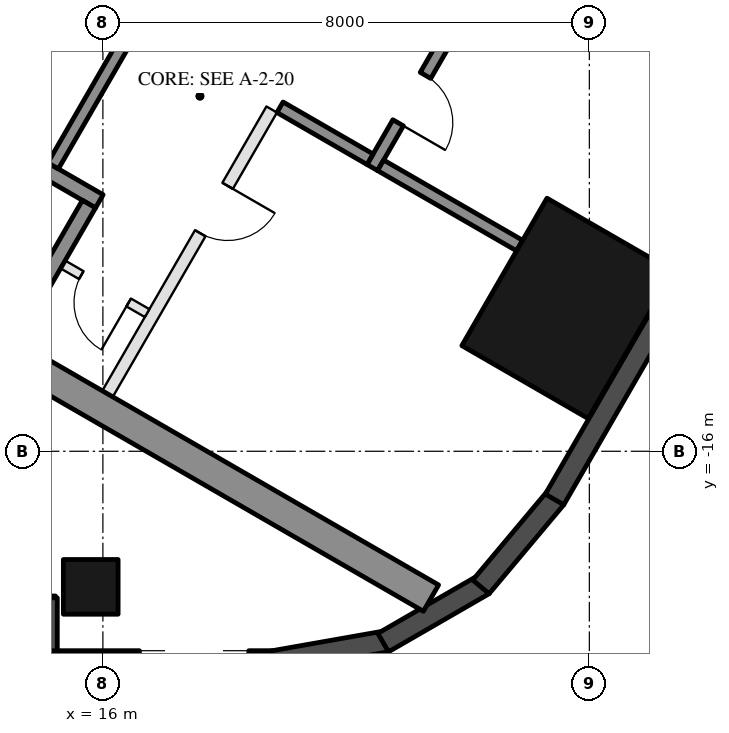
"""IFC4 building model, lengths in metres.
Left out: names, types, materials, properties, quantities, classifications, styles, units other than length and angle.
Written with IfcOpenShell. Run it as: python <this file> out.ifc"""

import sys

from ifc_helpers import new_model, si_unit, direction, frame, frame_2d, origin, origin_2d, place, context, subcontext, project, spatial, rectangle, hollow_rectangle, extrude, element, fill, save


model = new_model("IFC4")
c1 = context("Model", 3, precision=1e-05, world=origin(), true_north=direction((0.0, 1.0)))
c2 = subcontext(c1, "Body", "Model", "MODEL_VIEW")
j1 = project(units=[si_unit("LENGTHUNIT", "METRE"), si_unit("PLANEANGLEUNIT", "RADIAN")], contexts=[c1])
p1 = place(None, origin())
s1 = spatial("IfcSite", under=j1, at=p1, CompositionType="ELEMENT")
p2 = place(p1, origin())
s2 = spatial("IfcBuilding", under=s1, at=p2, CompositionType="ELEMENT")
p3 = place(p2, frame((0.0, 0.0, 94.6)))
s3 = spatial("IfcBuildingStorey", under=s2, at=p3, CompositionType="ELEMENT", Elevation=94.6)
p4 = place(p3, frame((15.8, -18.23, 0.0), z_axis=(0.0, 0.0, 1.0), x_axis=(-1.0, 0.0, 0.0)))
e1 = element("IfcColumn", 1, at=p4, inside=s3, PredefinedType="COLUMN", context=c2, shape_type="SweptSolid", body=[
    extrude(hollow_rectangle(XDim=0.9, YDim=0.9, WallThickness=0.04, at=origin_2d()), origin(), (0.0, 0.0, 1.0), 3.7),
])
p5 = place(p3, frame((23.643, -13.65, 0.0), z_axis=(0.0, 0.0, 1.0), x_axis=(0.5, 0.866025403784, 0.0)))
e2 = element("IfcColumn", 2, at=p5, inside=s3, PredefinedType="COLUMN", context=c2, shape_type="SweptSolid", body=[
    extrude(hollow_rectangle(XDim=2.8, YDim=2.4, WallThickness=0.07, at=origin_2d()), origin(), (0.0, 0.0, 1.0), 3.7),
])
p6 = place(p3, frame((8.48, -18.555, 0.0), z_axis=(0.0, 0.0, 1.0), x_axis=(1.0, 0.0, 0.0)))
e3 = element("IfcWall", 3, at=p6, inside=s3, PredefinedType="SOLIDWALL", context=c2, shape_type="SweptSolid", body=[
    extrude(rectangle(XDim=6.74, YDim=0.35, at=frame_2d((3.37, 0.0))), origin(), (0.0, 0.0, 1.0), 3.55),
])
p7 = place(p6, frame((3.57, 0.0, 0.0)))
e4 = element("IfcOpeningElement", 4, at=p7, cuts=e3, PredefinedType="OPENING", context=c2, shape_type="SweptSolid", body=[
    extrude(rectangle(XDim=2.4, YDim=2.4, at=frame_2d((1.2, 1.2))), frame((0.0, 0.185, 0.0), z_axis=(0.0, -1.0, 0.0), x_axis=(1.0, 0.0, 0.0)), (0.0, 0.0, 1.0), 0.37),
])
p8 = place(p6, frame((0.32, 0.0, 0.3)))
e5 = element("IfcOpeningElement", 5, at=p8, cuts=e3, PredefinedType="OPENING", context=c2, shape_type="SweptSolid", body=[
    extrude(rectangle(XDim=2.9, YDim=2.65, at=frame_2d((1.45, 1.325))), frame((0.0, 0.185, 0.0), z_axis=(0.0, -1.0, 0.0), x_axis=(1.0, 0.0, 0.0)), (0.0, 0.0, 1.0), 0.37),
])
p9 = place(p3, frame((15.075, -18.41, 0.0), z_axis=(0.0, 0.0, 1.0), x_axis=(0.0, -1.0, 0.0)))
e6 = element("IfcWall", 6, at=p9, inside=s3, PredefinedType="SOLIDWALL", context=c2, shape_type="SweptSolid", body=[
    extrude(rectangle(XDim=1.22, YDim=0.35, at=frame_2d((0.61, 0.0))), origin(), (0.0, 0.0, 1.0), 3.55),
])
p10 = place(p3, frame((14.9, -19.455, 0.0), z_axis=(0.0, 0.0, 1.0), x_axis=(1.0, 0.0, 0.0)))
e7 = element("IfcWall", 7, at=p10, inside=s3, PredefinedType="SOLIDWALL", context=c2, shape_type="SweptSolid", body=[
    extrude(rectangle(XDim=3.916, YDim=0.35, at=frame_2d((1.958, 0.0))), origin(), (0.0, 0.0, 1.0), 3.55),
])
p11 = place(p10, frame((1.7, 0.0, 0.3)))
e8 = element("IfcOpeningElement", 8, at=p11, cuts=e7, PredefinedType="OPENING", context=c2, shape_type="SweptSolid", body=[
    extrude(rectangle(XDim=1.8, YDim=2.65, at=frame_2d((0.9, 1.325))), frame((0.0, 0.185, 0.0), z_axis=(0.0, -1.0, 0.0), x_axis=(1.0, 0.0, 0.0)), (0.0, 0.0, 1.0), 0.37),
])
p12 = place(p3, frame((18.785, -19.458, 0.0), z_axis=(0.0, 0.0, 1.0), x_axis=(0.984798995425, 0.173697837091, 0.0)))
e9 = element("IfcWall", 9, at=p12, inside=s3, PredefinedType="SOLIDWALL", context=c2, shape_type="SweptSolid", body=[
    extrude(rectangle(XDim=1.91, YDim=0.35, at=frame_2d((0.955, 0.0))), origin(), (0.0, 0.0, 1.0), 3.55),
])
for number, where, z_axis, x_axis in (
    (10, (20.61, -19.147, 0.0), (0.0, 0.0, 1.0), (0.866, 0.5, 0.0)),
    (11, (22.217, -18.231, 0.0), (0.0, 0.0, 1.0), (0.643, 0.766, 0.0)),
):
    element("IfcWall", number, at=place(p3, frame(where, z_axis=z_axis, x_axis=x_axis)), inside=s3, PredefinedType="SOLIDWALL", context=c2, shape_type="SweptSolid", body=[
        extrude(rectangle(XDim=1.91, YDim=0.35, at=frame_2d((0.955, 0.0))), origin(), (0.0, 0.0, 1.0), 3.55),
    ])
p13 = place(p3, frame((23.427, -16.792, 0.0), z_axis=(0.0, 0.0, 1.0), x_axis=(0.500018773155, 0.866014564827, 0.0)))
e12 = element("IfcWall", 12, at=p13, inside=s3, PredefinedType="SOLIDWALL", context=c2, shape_type="SweptSolid", body=[
    extrude(rectangle(XDim=5.658, YDim=0.35, at=frame_2d((2.829, 0.0))), origin(), (0.0, 0.0, 1.0), 3.55),
])
for number, where, z_axis, x_axis in (
    (13, (8.547, -10.997, 0.0), (0.0, 0.0, 1.0), (0.866, -0.5, 0.0)),
    (14, (13.797, -1.903, 0.0), (0.0, 0.0, 1.0), (0.866, -0.5, 0.0)),
):
    element("IfcWall", number, at=place(p3, frame(where, z_axis=z_axis, x_axis=x_axis)), inside=s3, PredefinedType="SHEAR", context=c2, shape_type="SweptSolid", body=[
        extrude(rectangle(XDim=14.837, YDim=0.5, at=frame_2d((7.418, 0.0))), origin(), (0.0, 0.0, 1.0), 3.5),
    ])
p14 = place(p3, frame((10.356, -8.664, 0.0), z_axis=(0.0, 0.0, 1.0), x_axis=(0.866028629588, -0.499994412703, 0.0)))
e15 = element("IfcWall", 15, at=p14, inside=s3, PredefinedType="SHEAR", context=c2, shape_type="SweptSolid", body=[
    extrude(rectangle(XDim=6.45, YDim=0.25, at=frame_2d((3.225, 0.0))), origin(), (0.0, 0.0, 1.0), 3.5),
])
p15 = place(p14, frame((0.3, 0.0, 0.0)))
e16 = element("IfcOpeningElement", 16, at=p15, cuts=e15, PredefinedType="OPENING", context=c2, shape_type="SweptSolid", body=[
    extrude(rectangle(XDim=1.0, YDim=2.1, at=frame_2d((0.5, 1.05))), frame((0.0, 0.135, 0.0), z_axis=(0.0, -1.0, 0.0), x_axis=(1.0, 0.0, 0.0)), (0.0, 0.0, 1.0), 0.27),
])
p16 = place(p3, frame((14.496, -14.143, 0.0), z_axis=(0.0, 0.0, 1.0), x_axis=(0.500062241894, 0.865989465428, 0.0)))
e17 = element("IfcWall", 17, at=p16, inside=s3, PredefinedType="SHEAR", context=c2, shape_type="SweptSolid", body=[
    extrude(rectangle(XDim=2.55, YDim=0.25, at=frame_2d((1.275, 0.0))), origin(), (0.0, 0.0, 1.0), 3.5),
])
p17 = place(p3, frame((15.181, -11.305, 0.0), z_axis=(0.0, 0.0, 1.0), x_axis=(0.49994636267, 0.866056369097, 0.0)))
e18 = element("IfcWall", 18, at=p17, inside=s3, PredefinedType="SHEAR", context=c2, shape_type="SweptSolid", body=[
    extrude(rectangle(XDim=2.8, YDim=0.2, at=frame_2d((1.4, 0.0))), origin(), (0.0, 0.0, 1.0), 3.5),
])
p18 = place(p3, frame((20.43, -11.333, 0.0), z_axis=(0.0, 0.0, 1.0), x_axis=(0.500001309137, 0.866024647952, 0.0)))
e19 = element("IfcWall", 19, at=p18, inside=s3, PredefinedType="SHEAR", context=c2, shape_type="SweptSolid", body=[
    extrude(rectangle(XDim=2.4, YDim=0.2, at=frame_2d((1.2, 0.0))), origin(), (0.0, 0.0, 1.0), 3.5),
])
p19 = place(p18, frame((0.85, 0.0, 0.0)))
e20 = element("IfcOpeningElement", 20, at=p19, cuts=e19, PredefinedType="OPENING", context=c2, shape_type="SweptSolid", body=[
    extrude(rectangle(XDim=0.9, YDim=2.1, at=frame_2d((0.45, 1.05))), frame((0.0, 0.11, 0.0), z_axis=(0.0, -1.0, 0.0), x_axis=(1.0, 0.0, 0.0)), (0.0, 0.0, 1.0), 0.22),
])
p20 = place(p3, frame((18.913, -10.342, 0.0), z_axis=(0.0, 0.0, 1.0), x_axis=(0.866038183914, -0.499977863513, 0.0)))
e21 = element("IfcWall", 21, at=p20, inside=s3, PredefinedType="SHEAR", context=c2, shape_type="SweptSolid", body=[
    extrude(rectangle(XDim=1.71, YDim=0.2, at=frame_2d((0.855, 0.0))), origin(), (0.0, 0.0, 1.0), 3.5),
])
p21 = place(p3, frame((20.567, -11.297, 0.0), z_axis=(0.0, 0.0, 1.0), x_axis=(0.866060851709, -0.499938597367, 0.0)))
e22 = element("IfcWall", 22, at=p21, inside=s3, PredefinedType="SHEAR", context=c2, shape_type="SweptSolid", body=[
    extrude(rectangle(XDim=2.64, YDim=0.2, at=frame_2d((1.32, 0.0))), origin(), (0.0, 0.0, 1.0), 3.5),
])
p22 = place(p3, frame((16.076, -15.055, 0.0), z_axis=(0.0, 0.0, 1.0), x_axis=(0.499995103361, 0.866028230842, 0.0)))
e23 = element("IfcWall", 23, at=p22, inside=s3, PredefinedType="PARTITIONING", context=c2, shape_type="SweptSolid", body=[
    extrude(rectangle(XDim=5.4, YDim=0.2, at=frame_2d((2.7, 0.0))), origin(), (0.0, 0.0, 1.0), 3.5),
])
p23 = place(p22, frame((3.05, 0.0, 0.0)))
e24 = element("IfcOpeningElement", 24, at=p23, cuts=e23, PredefinedType="OPENING", context=c2, shape_type="SweptSolid", body=[
    extrude(rectangle(XDim=0.9, YDim=2.1, at=frame_2d((0.45, 1.05))), frame((0.0, 0.11, 0.0), z_axis=(0.0, -1.0, 0.0), x_axis=(1.0, 0.0, 0.0)), (0.0, 0.0, 1.0), 0.22),
])
p24 = place(p3, frame((15.342, -12.928, 0.0), z_axis=(0.0, 0.0, 1.0), x_axis=(0.865989903783, -0.500061482766, 0.0)))
e25 = element("IfcWall", 25, at=p24, inside=s3, PredefinedType="PARTITIONING", context=c2, shape_type="SweptSolid", body=[
    extrude(rectangle(XDim=1.6, YDim=0.15, at=frame_2d((0.8, 0.0))), origin(), (0.0, 0.0, 1.0), 3.5),
])
p25 = place(p24, frame((0.35, 0.0, 0.0)))
e26 = element("IfcOpeningElement", 26, at=p25, cuts=e25, PredefinedType="OPENING", context=c2, shape_type="SweptSolid", body=[
    extrude(rectangle(XDim=0.9, YDim=2.1, at=frame_2d((0.45, 1.05))), frame((0.0, 0.085, 0.0), z_axis=(0.0, -1.0, 0.0), x_axis=(1.0, 0.0, 0.0)), (0.0, 0.0, 1.0), 0.17),
])
p26 = place(p25, frame((0.9, 0.0, 0.0), z_axis=(0.0, 0.0, 1.0), x_axis=(-1.0, 0.0, 0.0)))
e27 = element("IfcDoor", 27, at=p26, inside=s3, OperationType="SINGLE_SWING_LEFT", PredefinedType="DOOR", context=c2, shape_type="SweptSolid", body=[
    extrude(rectangle(XDim=0.9, YDim=2.1, at=frame_2d((0.45, 1.05))), frame((0.0, 0.025, 0.0), z_axis=(0.0, -1.0, 0.0), x_axis=(1.0, 0.0, 0.0)), (0.0, 0.0, 1.0), 0.05),
])
fill(e26, e27)
p27 = place(p19, frame((0.9, 0.0, 0.0), z_axis=(0.0, 0.0, 1.0), x_axis=(-1.0, 0.0, 0.0)))
e28 = element("IfcDoor", 28, at=p27, inside=s3, OperationType="SINGLE_SWING_RIGHT", PredefinedType="DOOR", context=c2, shape_type="SweptSolid", body=[
    extrude(rectangle(XDim=0.9, YDim=2.1, at=frame_2d((0.45, 1.05))), frame((0.0, 0.025, 0.0), z_axis=(0.0, -1.0, 0.0), x_axis=(1.0, 0.0, 0.0)), (0.0, 0.0, 1.0), 0.05),
])
fill(e20, e28)
p28 = place(p23, frame((0.9, 0.0, 0.0), z_axis=(0.0, 0.0, 1.0), x_axis=(-1.0, 0.0, 0.0)))
e29 = element("IfcDoor", 29, at=p28, inside=s3, OperationType="SINGLE_SWING_LEFT", PredefinedType="DOOR", context=c2, shape_type="SweptSolid", body=[
    extrude(rectangle(XDim=0.9, YDim=2.1, at=frame_2d((0.45, 1.05))), frame((0.0, 0.025, 0.0), z_axis=(0.0, -1.0, 0.0), x_axis=(1.0, 0.0, 0.0)), (0.0, 0.0, 1.0), 0.05),
])
fill(e24, e29)
save(model, sys.argv[1])
